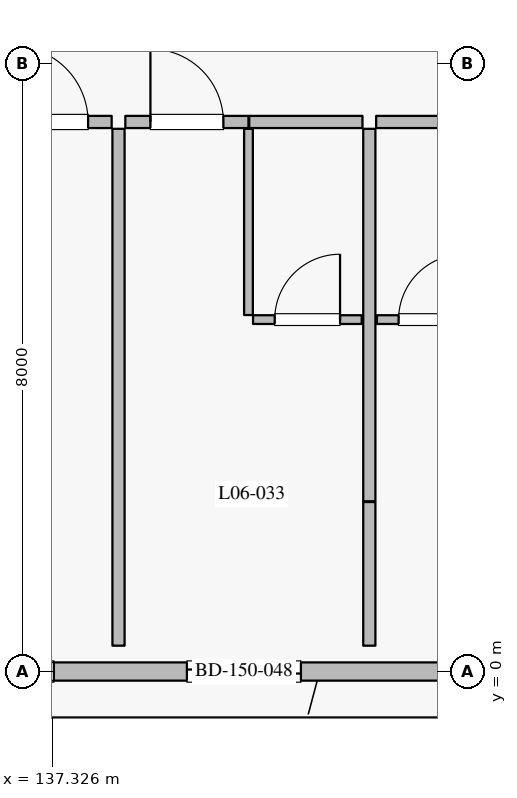
"""IFC4 building model, lengths in metres.
Left out: names, types, materials, properties, quantities, classifications, styles, units other than length and angle.
Written with IfcOpenShell. Run it as: python <this file> out.ifc"""

import sys

from ifc_helpers import new_model, si_unit, direction, frame, frame_2d, origin, place, context, subcontext, project, spatial, rectangle, extrude, element, fill, save


model = new_model("IFC4")
c1 = context("Model", 3, precision=1e-05, world=origin(), true_north=direction((0.0, 1.0)))
c2 = subcontext(c1, "Body", "Model", "MODEL_VIEW")
j1 = project(units=[si_unit("LENGTHUNIT", "METRE"), si_unit("PLANEANGLEUNIT", "RADIAN")], contexts=[c1])
p1 = place(None, origin())
s1 = spatial("IfcSite", under=j1, at=p1, CompositionType="ELEMENT")
p2 = place(p1, origin())
s2 = spatial("IfcBuilding", under=s1, at=p2, CompositionType="ELEMENT")
p3 = place(p2, frame((0.0, 0.0, 28.8)))
s3 = spatial("IfcBuildingStorey", under=s2, at=p3, CompositionType="ELEMENT", Elevation=28.8)
p4 = place(p3, frame((142.45, 0.0, 0.0), z_axis=(0.0, 0.0, 1.0), x_axis=(-1.0, 0.0, 0.0)))
e1 = element("IfcWall", 1, at=p4, inside=s3, PredefinedType="SOLIDWALL", context=c2, shape_type="SweptSolid", body=[
    extrude(rectangle(XDim=7.7, YDim=0.24, at=frame_2d((3.85, 0.0))), origin(), (0.0, 0.0, 1.0), 2.93),
])
p5 = place(p4, frame((1.85, 0.0, 0.0)))
e2 = element("IfcOpeningElement", 2, at=p5, cuts=e1, PredefinedType="OPENING", context=c2, shape_type="SweptSolid", body=[
    extrude(rectangle(XDim=1.5, YDim=2.25, at=frame_2d((0.75, 1.125))), frame((0.0, 0.13, 0.0), z_axis=(0.0, -1.0, 0.0), x_axis=(1.0, 0.0, 0.0)), (0.0, 0.0, 1.0), 0.26),
])
p6 = place(p4, frame((5.1, 0.0, 0.8)))
e3 = element("IfcOpeningElement", 3, at=p6, cuts=e1, PredefinedType="OPENING", context=c2, shape_type="SweptSolid", body=[
    extrude(rectangle(XDim=1.6, YDim=1.6, at=frame_2d((0.8, 0.8))), frame((0.0, 0.13, 0.0), z_axis=(0.0, -1.0, 0.0), x_axis=(1.0, 0.0, 0.0)), (0.0, 0.0, 1.0), 0.26),
])
p7 = place(p3, frame((136.49, 7.23, 0.0), z_axis=(0.0, 0.0, 1.0), x_axis=(1.0, 0.0, 0.0)))
e4 = element("IfcWall", 4, at=p7, inside=s3, PredefinedType="PARTITIONING", context=c2, shape_type="SweptSolid", body=[
    extrude(rectangle(XDim=1.62, YDim=0.16, at=frame_2d((0.81, 0.0))), origin(), (0.0, 0.0, 1.0), 3.365),
])
p8 = place(p7, frame((0.31, 0.0, 0.0)))
e5 = element("IfcOpeningElement", 5, at=p8, cuts=e4, PredefinedType="OPENING", context=c2, shape_type="SweptSolid", body=[
    extrude(rectangle(XDim=1.0, YDim=2.25, at=frame_2d((0.5, 1.125))), frame((0.0, 0.09, 0.0), z_axis=(0.0, -1.0, 0.0), x_axis=(1.0, 0.0, 0.0)), (0.0, 0.0, 1.0), 0.18),
])
p9 = place(p3, frame((138.29, 7.23, 0.0), z_axis=(0.0, 0.0, 1.0), x_axis=(1.0, 0.0, 0.0)))
e6 = element("IfcWall", 6, at=p9, inside=s3, PredefinedType="PARTITIONING", context=c2, shape_type="SweptSolid", body=[
    extrude(rectangle(XDim=1.62, YDim=0.16, at=frame_2d((0.81, 0.0))), origin(), (0.0, 0.0, 1.0), 3.365),
])
p10 = place(p9, frame((0.33, 0.0, 0.0)))
e7 = element("IfcOpeningElement", 7, at=p10, cuts=e6, PredefinedType="OPENING", context=c2, shape_type="SweptSolid", body=[
    extrude(rectangle(XDim=0.96, YDim=2.2, at=frame_2d((0.48, 1.1))), frame((0.0, 0.09, 0.0), z_axis=(0.0, -1.0, 0.0), x_axis=(1.0, 0.0, 0.0)), (0.0, 0.0, 1.0), 0.18),
])
p11 = place(p3, frame((139.92, 7.23, 0.0), z_axis=(0.0, 0.0, 1.0), x_axis=(1.0, 0.0, 0.0)))
e8 = element("IfcWall", 8, at=p11, inside=s3, PredefinedType="PARTITIONING", context=c2, shape_type="SweptSolid", body=[
    extrude(rectangle(XDim=1.49, YDim=0.16, at=frame_2d((0.745, 0.0))), origin(), (0.0, 0.0, 1.0), 3.365),
])
p12 = place(p3, frame((139.91, 4.69, 0.0), z_axis=(0.0, 0.0, 1.0), x_axis=(0.0, 1.0, 0.0)))
e9 = element("IfcWall", 9, at=p12, inside=s3, PredefinedType="PARTITIONING", context=c2, shape_type="SweptSolid", body=[
    extrude(rectangle(XDim=2.45, YDim=0.115, at=frame_2d((1.225, 0.0))), origin(), (0.0, 0.0, 1.0), 3.365),
])
p13 = place(p3, frame((139.97, 4.63, 0.0), z_axis=(0.0, 0.0, 1.0), x_axis=(1.0, 0.0, 0.0)))
e10 = element("IfcWall", 10, at=p13, inside=s3, PredefinedType="PARTITIONING", context=c2, shape_type="SweptSolid", body=[
    extrude(rectangle(XDim=1.43, YDim=0.115, at=frame_2d((0.715, 0.0))), origin(), (0.0, 0.0, 1.0), 3.365),
])
p14 = place(p13, frame((0.285, 0.0, 0.0)))
e11 = element("IfcOpeningElement", 11, at=p14, cuts=e10, PredefinedType="OPENING", context=c2, shape_type="SweptSolid", body=[
    extrude(rectangle(XDim=0.86, YDim=2.12, at=frame_2d((0.43, 1.06))), frame((0.0, 0.067, 0.0), z_axis=(0.0, -1.0, 0.0), x_axis=(1.0, 0.0, 0.0)), (0.0, 0.0, 1.0), 0.135),
])
p15 = place(p3, frame((138.2, 0.34, 0.0), z_axis=(0.0, 0.0, 1.0), x_axis=(0.0, 1.0, 0.0)))
e12 = element("IfcWall", 12, at=p15, inside=s3, PredefinedType="PARTITIONING", context=c2, shape_type="SweptSolid", body=[
    extrude(rectangle(XDim=6.8, YDim=0.16, at=frame_2d((3.4, 0.0))), origin(), (0.0, 0.0, 1.0), 3.365),
])
p16 = place(p3, frame((141.5, 0.34, 0.0), z_axis=(0.0, 0.0, 1.0), x_axis=(0.0, 1.0, 0.0)))
e13 = element("IfcWall", 13, at=p16, inside=s3, PredefinedType="PARTITIONING", context=c2, shape_type="SweptSolid", body=[
    extrude(rectangle(XDim=1.89, YDim=0.16, at=frame_2d((0.945, 0.0))), origin(), (0.0, 0.0, 1.0), 3.365),
])
p17 = place(p3, frame((141.59, 7.23, 0.0), z_axis=(0.0, 0.0, 1.0), x_axis=(1.0, 0.0, 0.0)))
e14 = element("IfcWall", 14, at=p17, inside=s3, PredefinedType="PARTITIONING", context=c2, shape_type="SweptSolid", body=[
    extrude(rectangle(XDim=1.49, YDim=0.16, at=frame_2d((0.745, 0.0))), origin(), (0.0, 0.0, 1.0), 3.365),
])
p18 = place(p3, frame((141.6, 4.63, 0.0), z_axis=(0.0, 0.0, 1.0), x_axis=(1.0, 0.0, 0.0)))
e15 = element("IfcWall", 15, at=p18, inside=s3, PredefinedType="PARTITIONING", context=c2, shape_type="SweptSolid", body=[
    extrude(rectangle(XDim=1.43, YDim=0.115, at=frame_2d((0.715, 0.0))), origin(), (0.0, 0.0, 1.0), 3.365),
])
p19 = place(p18, frame((0.285, 0.0, 0.0)))
e16 = element("IfcOpeningElement", 16, at=p19, cuts=e15, PredefinedType="OPENING", context=c2, shape_type="SweptSolid", body=[
    extrude(rectangle(XDim=0.86, YDim=2.12, at=frame_2d((0.43, 1.06))), frame((0.0, 0.067, 0.0), z_axis=(0.0, -1.0, 0.0), x_axis=(1.0, 0.0, 0.0)), (0.0, 0.0, 1.0), 0.135),
])
p20 = place(p3, frame((141.5, 2.24, 0.0), z_axis=(0.0, 0.0, 1.0), x_axis=(0.0, 1.0, 0.0)))
e17 = element("IfcWall", 17, at=p20, inside=s3, PredefinedType="PARTITIONING", context=c2, shape_type="SweptSolid", body=[
    extrude(rectangle(XDim=4.9, YDim=0.16, at=frame_2d((2.45, 0.0))), origin(), (0.0, 0.0, 1.0), 3.365),
])
p21 = place(p5, origin())
e18 = element("IfcDoor", 18, at=p21, inside=s3, OperationType="SLIDING_TO_LEFT", PredefinedType="DOOR", context=c2, shape_type="SweptSolid", body=[
    extrude(rectangle(XDim=1.5, YDim=2.25, at=frame_2d((0.75, 1.125))), frame((0.0, 0.025, 0.0), z_axis=(0.0, -1.0, 0.0), x_axis=(1.0, 0.0, 0.0)), (0.0, 0.0, 1.0), 0.05),
])
fill(e2, e18)
p22 = place(p6, origin())
e19 = element("IfcWindow", 19, at=p22, inside=s3, PartitioningType="SINGLE_PANEL", PredefinedType="WINDOW", context=c2, shape_type="SweptSolid", body=[
    extrude(rectangle(XDim=1.6, YDim=1.6, at=frame_2d((0.8, 0.8))), frame((0.0, 0.03, 0.0), z_axis=(0.0, -1.0, 0.0), x_axis=(1.0, 0.0, 0.0)), (0.0, 0.0, 1.0), 0.06),
])
fill(e3, e19)
p23 = place(p8, origin())
e20 = element("IfcDoor", 20, at=p23, inside=s3, OperationType="SINGLE_SWING_LEFT", PredefinedType="DOOR", context=c2, shape_type="SweptSolid", body=[
    extrude(rectangle(XDim=1.0, YDim=2.25, at=frame_2d((0.5, 1.125))), frame((0.0, 0.025, 0.0), z_axis=(0.0, -1.0, 0.0), x_axis=(1.0, 0.0, 0.0)), (0.0, 0.0, 1.0), 0.05),
])
fill(e5, e20)
p24 = place(p10, origin())
e21 = element("IfcDoor", 21, at=p24, inside=s3, OperationType="SINGLE_SWING_LEFT", PredefinedType="DOOR", context=c2, shape_type="SweptSolid", body=[
    extrude(rectangle(XDim=0.96, YDim=2.2, at=frame_2d((0.48, 1.1))), frame((0.0, 0.025, 0.0), z_axis=(0.0, -1.0, 0.0), x_axis=(1.0, 0.0, 0.0)), (0.0, 0.0, 1.0), 0.05),
])
fill(e7, e21)
p25 = place(p14, origin())
e22 = element("IfcDoor", 22, at=p25, inside=s3, OperationType="SINGLE_SWING_RIGHT", PredefinedType="DOOR", context=c2, shape_type="SweptSolid", body=[
    extrude(rectangle(XDim=0.86, YDim=2.12, at=frame_2d((0.43, 1.06))), frame((0.0, 0.025, 0.0), z_axis=(0.0, -1.0, 0.0), x_axis=(1.0, 0.0, 0.0)), (0.0, 0.0, 1.0), 0.05),
])
fill(e11, e22)
p26 = place(p19, origin())
e23 = element("IfcDoor", 23, at=p26, inside=s3, OperationType="SINGLE_SWING_RIGHT", PredefinedType="DOOR", context=c2, shape_type="SweptSolid", body=[
    extrude(rectangle(XDim=0.86, YDim=2.12, at=frame_2d((0.43, 1.06))), frame((0.0, 0.025, 0.0), z_axis=(0.0, -1.0, 0.0), x_axis=(1.0, 0.0, 0.0)), (0.0, 0.0, 1.0), 0.05),
])
fill(e16, e23)
save(model, sys.argv[1])
